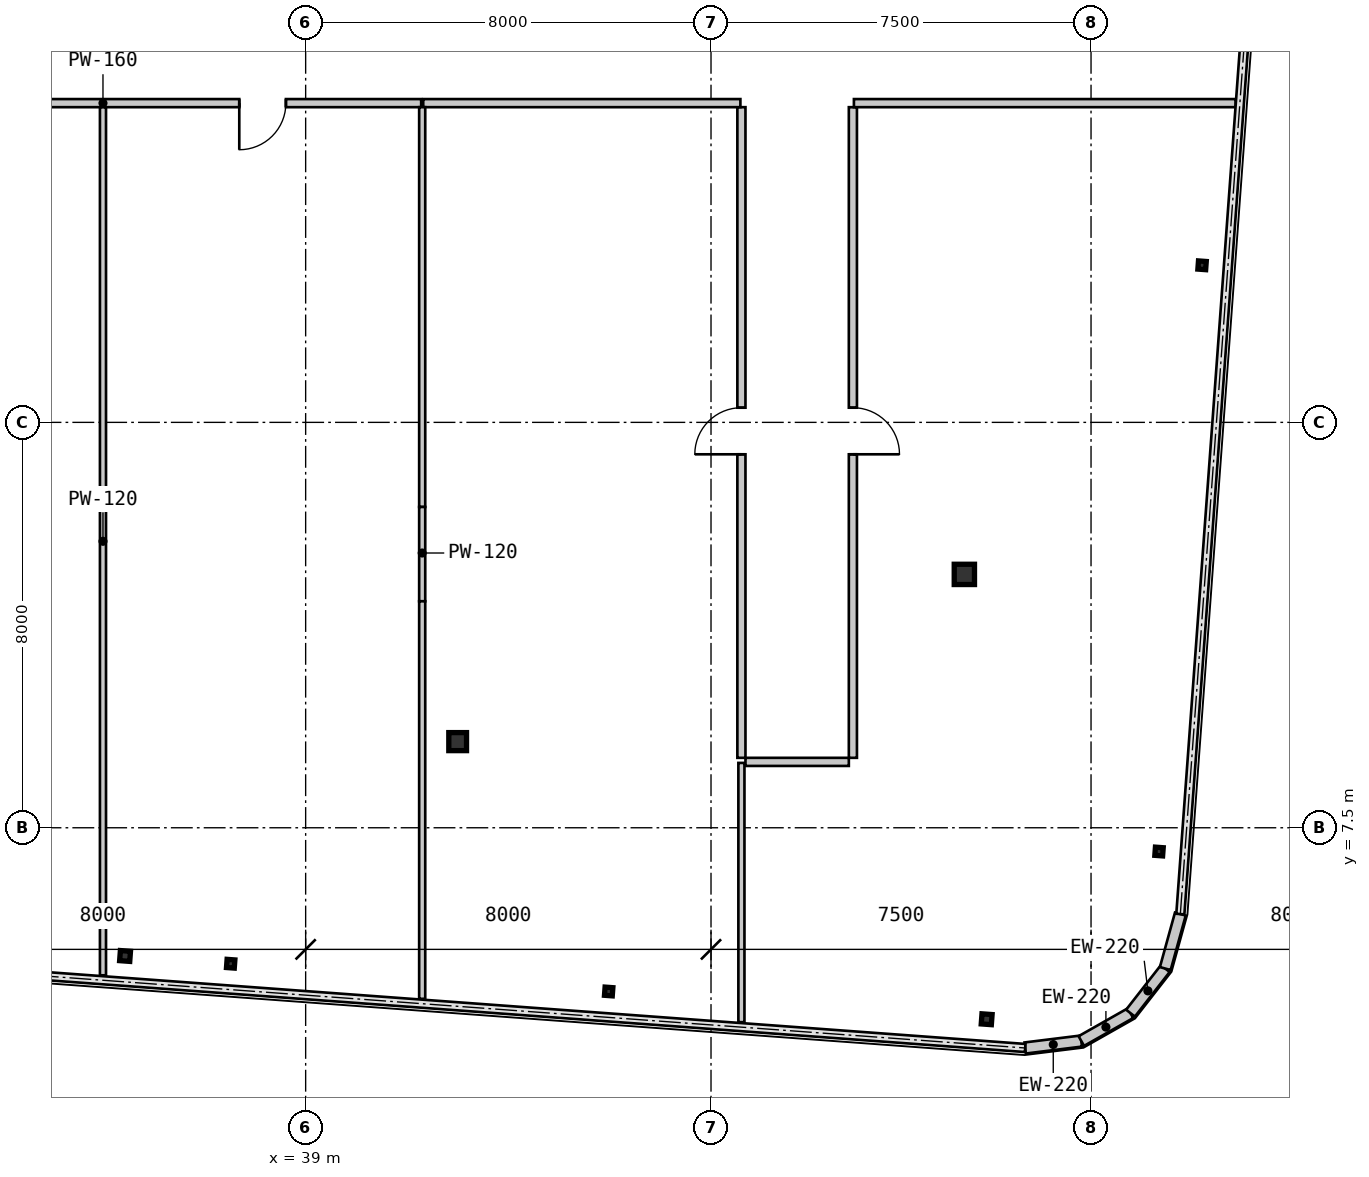
"""IFC4 building model, lengths in metres.
Left out: names, types, materials, properties, quantities, classifications, styles, units other than length and angle.
Written with IfcOpenShell. Run it as: python <this file> out.ifc"""

import sys

from ifc_helpers import new_model, si_unit, direction, frame, frame_2d, origin, origin_2d, place, context, subcontext, project, spatial, rectangle, hollow_rectangle, i_section, extrude, source, transform, mapped, element, fill, save


model = new_model("IFC4")
c1 = context("Model", 3, precision=1e-05, world=origin(), true_north=direction((0.0, 1.0)))
c2 = subcontext(c1, "Body", "Model", "MODEL_VIEW")
j1 = project(units=[si_unit("LENGTHUNIT", "METRE"), si_unit("PLANEANGLEUNIT", "RADIAN")], contexts=[c1])
p1 = place(None, origin())
s1 = spatial("IfcSite", under=j1, at=p1, CompositionType="ELEMENT")
p2 = place(p1, origin())
s2 = spatial("IfcBuilding", under=s1, at=p2, CompositionType="ELEMENT")
p3 = place(p2, frame((0.0, 0.0, 220.85)))
s3 = spatial("IfcBuildingStorey", under=s2, at=p3, CompositionType="ELEMENT", Elevation=220.85)
m1 = source(origin(), c2, "Body", "SweptSolid", [
    extrude(i_section(OverallWidth=0.35, OverallDepth=0.356, WebThickness=0.018, FlangeThickness=0.028, at=origin_2d()), origin(), (0.0, 0.0, 1.0), 3.15),
])
p4 = place(p3, frame((42.0, 9.2, 0.0), z_axis=(0.0, 0.0, 1.0), x_axis=(1.0, 0.0, 0.0)))
e1 = element("IfcColumn", 1, at=p4, inside=s3, PredefinedType="COLUMN", context=c2, shape_type="MappedRepresentation", body=[
    mapped(m1, transform((0.0, 0.0, 0.0), scale=1.0)),
])
m2 = source(origin(), c2, "Body", "SweptSolid", [
    extrude(hollow_rectangle(XDim=0.4, YDim=0.4, WallThickness=0.016, at=origin_2d()), origin(), (0.0, 0.0, 1.0), 3.15),
])
p5 = place(p3, frame((52.0, 12.5, 0.0), z_axis=(0.0, 0.0, 1.0), x_axis=(1.0, 0.0, 0.0)))
e2 = element("IfcColumn", 2, at=p5, inside=s3, PredefinedType="COLUMN", context=c2, shape_type="MappedRepresentation", body=[
    mapped(m2, transform((0.0, 0.0, 0.0), scale=1.0)),
])
m3 = source(origin(), c2, "Body", "SweptSolid", [
    extrude(i_section(OverallWidth=0.154, OverallDepth=0.162, WebThickness=0.008, FlangeThickness=0.011, at=origin_2d()), origin(), (0.0, 0.0, 1.0), 3.15),
])
for number, where, z_axis, x_axis in (
    (3, (37.521, 4.817, 0.0), (0.0, 0.0, 1.0), (0.997, -0.073, 0.0)),
    (4, (44.98, 4.269, 0.0), (0.0, 0.0, 1.0), (0.997, -0.073, 0.0)),
):
    element("IfcColumn", number, at=place(p3, frame(where, z_axis=z_axis, x_axis=x_axis)), inside=s3, PredefinedType="COLUMN", context=c2, shape_type="MappedRepresentation", body=[
        mapped(m3, transform((0.0, 0.0, 0.0), scale=1.0)),
    ])
m4 = source(origin(), c2, "Body", "SweptSolid", [
    extrude(hollow_rectangle(XDim=0.2, YDim=0.2, WallThickness=0.009, at=origin_2d()), origin(), (0.0, 0.0, 1.0), 3.15),
])
p6 = place(p3, frame((52.44, 3.721, 0.0), z_axis=(0.0, 0.0, 1.0), x_axis=(0.997314477224, -0.073238197128, 0.0)))
e5 = element("IfcColumn", 5, at=p6, inside=s3, PredefinedType="COLUMN", context=c2, shape_type="MappedRepresentation", body=[
    mapped(m4, transform((0.0, 0.0, 0.0), scale=1.0)),
])
for number, where, z_axis, x_axis in (
    (6, (55.842, 7.031, 0.0), (0.0, 0.0, 1.0), (0.997, -0.073, 0.0)),
    (7, (56.691, 18.6, 0.0), (0.0, 0.0, 1.0), (0.997, -0.073, 0.0)),
):
    element("IfcColumn", number, at=place(p3, frame(where, z_axis=z_axis, x_axis=x_axis)), inside=s3, PredefinedType="COLUMN", context=c2, shape_type="MappedRepresentation", body=[
        mapped(m3, transform((0.0, 0.0, 0.0), scale=1.0)),
    ])
p7 = place(p3, frame((35.436, 4.97, 0.0), z_axis=(0.0, 0.0, 1.0), x_axis=(0.997314477224, -0.073238197128, 0.0)))
e8 = element("IfcColumn", 8, at=p7, inside=s3, PredefinedType="COLUMN", context=c2, shape_type="MappedRepresentation", body=[
    mapped(m4, transform((0.0, 0.0, 0.0), scale=1.0)),
])
m5 = source(origin(), c2, "Body", "SweptSolid", [
    extrude(rectangle(XDim=1.116, YDim=0.22, at=frame_2d((0.558, 0.0))), origin(), (0.0, 0.0, 1.0), 2.93),
])
p8 = place(p3, frame((53.201, 3.154, 0.0), z_axis=(0.0, 0.0, 1.0), x_axis=(0.992438604032, 0.122742076028, 0.0)))
e9 = element("IfcWall", 9, at=p8, inside=s3, PredefinedType="SOLIDWALL", context=c2, shape_type="MappedRepresentation", body=[
    mapped(m5, transform((0.0, 0.0, 0.0), scale=1.0)),
])
m6 = source(origin(), c2, "Body", "SweptSolid", [
    extrude(rectangle(XDim=1.116, YDim=0.22, at=frame_2d((0.558, 0.0))), origin(), (0.0, 0.0, 1.0), 2.93),
])
p9 = place(p3, frame((54.308, 3.291, 0.0), z_axis=(0.0, 0.0, 1.0), x_axis=(0.869893934693, 0.49323882895, 0.0)))
e10 = element("IfcWall", 10, at=p9, inside=s3, PredefinedType="SOLIDWALL", context=c2, shape_type="MappedRepresentation", body=[
    mapped(m6, transform((0.0, 0.0, 0.0), scale=1.0)),
])
for number, where, z_axis, x_axis in (
    (11, (55.279, 3.841, 0.0), (0.0, 0.0, 1.0), (0.615, 0.789, 0.0)),
    (12, (55.965, 4.721, 0.0), (0.0, 0.0, 1.0), (0.266, 0.964, 0.0)),
):
    element("IfcWall", number, at=place(p3, frame(where, z_axis=z_axis, x_axis=x_axis)), inside=s3, PredefinedType="SOLIDWALL", context=c2, shape_type="MappedRepresentation", body=[
        mapped(m5, transform((0.0, 0.0, 0.0), scale=1.0)),
    ])
m7 = source(origin(), c2, "Body", "SweptSolid", [
    extrude(rectangle(XDim=6.26, YDim=0.16, at=frame_2d((3.13, 0.0))), origin(), (0.0, 0.0, 1.0), 2.93),
])
p10 = place(p3, frame((34.98, 21.8, 0.0), z_axis=(0.0, 0.0, 1.0), x_axis=(-1.0, 0.0, 0.0)))
e13 = element("IfcWall", 13, at=p10, inside=s3, PredefinedType="PARTITIONING", context=c2, shape_type="MappedRepresentation", body=[
    mapped(m7, transform((0.0, 0.0, 0.0), scale=1.0)),
])
m8 = source(origin(), c2, "Body", "SweptSolid", [
    extrude(rectangle(XDim=0.92, YDim=2.1, at=frame_2d((0.46, 1.05))), frame((0.0, 0.09, 0.0), z_axis=(0.0, -1.0, 0.0), x_axis=(1.0, 0.0, 0.0)), (0.0, 0.0, 1.0), 0.18),
])
p11 = place(p10, frame((2.67, 0.0, 0.0)))
e14 = element("IfcOpeningElement", 14, at=p11, cuts=e13, PredefinedType="OPENING", context=c2, shape_type="MappedRepresentation", body=[
    mapped(m8, transform((0.0, 0.0, 0.0), scale=1.0)),
])
p12 = place(p3, frame((41.28, 21.8, 0.0), z_axis=(0.0, 0.0, 1.0), x_axis=(-1.0, 0.0, 0.0)))
e15 = element("IfcWall", 15, at=p12, inside=s3, PredefinedType="PARTITIONING", context=c2, shape_type="MappedRepresentation", body=[
    mapped(m7, transform((0.0, 0.0, 0.0), scale=1.0)),
])
p13 = place(p12, frame((2.67, 0.0, 0.0)))
e16 = element("IfcOpeningElement", 16, at=p13, cuts=e15, PredefinedType="OPENING", context=c2, shape_type="MappedRepresentation", body=[
    mapped(m8, transform((0.0, 0.0, 0.0), scale=1.0)),
])
m9 = source(origin(), c2, "Body", "SweptSolid", [
    extrude(rectangle(XDim=12.84, YDim=0.16, at=frame_2d((6.42, 0.0))), origin(), (0.0, 0.0, 1.0), 2.93),
])
p14 = place(p3, frame((47.6, 8.88, 0.0), z_axis=(0.0, 0.0, 1.0), x_axis=(0.0, 1.0, 0.0)))
e17 = element("IfcWall", 17, at=p14, inside=s3, PredefinedType="PARTITIONING", context=c2, shape_type="MappedRepresentation", body=[
    mapped(m9, transform((0.0, 0.0, 0.0), scale=1.0)),
])
p15 = place(p14, frame((5.99, 0.0, 0.0)))
e18 = element("IfcOpeningElement", 18, at=p15, cuts=e17, PredefinedType="OPENING", context=c2, shape_type="MappedRepresentation", body=[
    mapped(m8, transform((0.0, 0.0, 0.0), scale=1.0)),
])
m10 = source(origin(), c2, "Body", "SweptSolid", [
    extrude(rectangle(XDim=6.259, YDim=0.16, at=frame_2d((3.13, 0.0))), origin(), (0.0, 0.0, 1.0), 2.93),
])
p16 = place(p3, frame((47.58, 21.8, 0.0), z_axis=(0.0, 0.0, 1.0), x_axis=(-1.0, 0.0, 0.0)))
e19 = element("IfcWall", 19, at=p16, inside=s3, PredefinedType="PARTITIONING", context=c2, shape_type="MappedRepresentation", body=[
    mapped(m10, transform((0.0, 0.0, 0.0), scale=1.0)),
])
p17 = place(p3, frame((49.8, 21.72, 0.0), z_axis=(0.0, 0.0, 1.0), x_axis=(0.0, -1.0, 0.0)))
e20 = element("IfcWall", 20, at=p17, inside=s3, PredefinedType="PARTITIONING", context=c2, shape_type="MappedRepresentation", body=[
    mapped(m9, transform((0.0, 0.0, 0.0), scale=1.0)),
])
p18 = place(p17, frame((5.93, 0.0, 0.0)))
e21 = element("IfcOpeningElement", 21, at=p18, cuts=e20, PredefinedType="OPENING", context=c2, shape_type="MappedRepresentation", body=[
    mapped(m8, transform((0.0, 0.0, 0.0), scale=1.0)),
])
m11 = source(origin(), c2, "Body", "SweptSolid", [
    extrude(rectangle(XDim=7.533, YDim=0.16, at=frame_2d((3.767, 0.0))), origin(), (0.0, 0.0, 1.0), 2.93),
])
p19 = place(p3, frame((57.353, 21.8, 0.0), z_axis=(0.0, 0.0, 1.0), x_axis=(-1.0, 0.0, 0.0)))
e22 = element("IfcWall", 22, at=p19, inside=s3, PredefinedType="PARTITIONING", context=c2, shape_type="MappedRepresentation", body=[
    mapped(m11, transform((0.0, 0.0, 0.0), scale=1.0)),
])
m12 = source(origin(), c2, "Body", "SweptSolid", [
    extrude(rectangle(XDim=2.04, YDim=0.16, at=frame_2d((1.02, 0.0))), origin(), (0.0, 0.0, 1.0), 2.93),
])
p20 = place(p3, frame((49.72, 8.8, 0.0), z_axis=(0.0, 0.0, 1.0), x_axis=(-1.0, 0.0, 0.0)))
e23 = element("IfcWall", 23, at=p20, inside=s3, PredefinedType="PARTITIONING", context=c2, shape_type="MappedRepresentation", body=[
    mapped(m12, transform((0.0, 0.0, 0.0), scale=1.0)),
])
m13 = source(origin(), c2, "Body", "SweptSolid", [
    extrude(rectangle(XDim=17.13, YDim=0.12, at=frame_2d((8.565, 0.0))), origin(), (0.0, 0.0, 1.0), 2.93),
])
p21 = place(p3, frame((35.0, 21.718, 0.0), z_axis=(0.0, 0.0, 1.0), x_axis=(0.0, -1.0, 0.0)))
e24 = element("IfcWall", 24, at=p21, inside=s3, PredefinedType="PARTITIONING", context=c2, shape_type="MappedRepresentation", body=[
    mapped(m13, transform((0.0, 0.0, 0.0), scale=1.0)),
])
m14 = source(origin(), c2, "Body", "SweptSolid", [
    extrude(rectangle(XDim=7.89, YDim=0.12, at=frame_2d((3.945, 0.0))), origin(), (0.0, 0.0, 1.0), 2.93),
])
p22 = place(p3, frame((41.3, 21.72, 0.0), z_axis=(0.0, 0.0, 1.0), x_axis=(0.0, -1.0, 0.0)))
e25 = element("IfcWall", 25, at=p22, inside=s3, PredefinedType="PARTITIONING", context=c2, shape_type="MappedRepresentation", body=[
    mapped(m14, transform((0.0, 0.0, 0.0), scale=1.0)),
])
m15 = source(origin(), c2, "Body", "SweptSolid", [
    extrude(rectangle(XDim=1.861, YDim=0.12, at=frame_2d((0.93, 0.0))), origin(), (0.0, 0.0, 1.0), 2.328),
])
p23 = place(p3, frame((41.3, 13.83, 0.0), z_axis=(0.0, 0.0, 1.0), x_axis=(0.0, -1.0, 0.0)))
e26 = element("IfcWall", 26, at=p23, inside=s3, PredefinedType="PARTITIONING", context=c2, shape_type="MappedRepresentation", body=[
    mapped(m15, transform((0.0, 0.0, 0.0), scale=1.0)),
])
m16 = source(origin(), c2, "Body", "SweptSolid", [
    extrude(rectangle(XDim=7.845, YDim=0.12, at=frame_2d((3.923, 0.0))), origin(), (0.0, 0.0, 1.0), 2.93),
])
p24 = place(p3, frame((41.3, 11.969, 0.0), z_axis=(0.0, 0.0, 1.0), x_axis=(0.0, -1.0, 0.0)))
e27 = element("IfcWall", 27, at=p24, inside=s3, PredefinedType="PARTITIONING", context=c2, shape_type="MappedRepresentation", body=[
    mapped(m16, transform((0.0, 0.0, 0.0), scale=1.0)),
])
m17 = source(origin(), c2, "Body", "SweptSolid", [
    extrude(rectangle(XDim=5.116, YDim=0.12, at=frame_2d((2.558, 0.0))), origin(), (0.0, 0.0, 1.0), 2.93),
])
p25 = place(p3, frame((47.6, 8.78, 0.0), z_axis=(0.0, 0.0, 1.0), x_axis=(0.0, -1.0, 0.0)))
e28 = element("IfcWall", 28, at=p25, inside=s3, PredefinedType="PARTITIONING", context=c2, shape_type="MappedRepresentation", body=[
    mapped(m17, transform((0.0, 0.0, 0.0), scale=1.0)),
])
m18 = source(origin(), c2, "Body", "SweptSolid", [
    extrude(rectangle(XDim=0.92, YDim=2.1, at=frame_2d((0.46, 1.05))), frame((0.0, 0.025, 0.0), z_axis=(0.0, -1.0, 0.0), x_axis=(1.0, 0.0, 0.0)), (0.0, 0.0, 1.0), 0.05),
])
p26 = place(p13, origin())
e29 = element("IfcDoor", 29, at=p26, inside=s3, OperationType="SINGLE_SWING_RIGHT", PredefinedType="DOOR", context=c2, shape_type="MappedRepresentation", body=[
    mapped(m18, transform((0.0, 0.0, 0.0), scale=1.0)),
])
fill(e16, e29)
p27 = place(p15, origin())
e30 = element("IfcDoor", 30, at=p27, inside=s3, OperationType="SINGLE_SWING_LEFT", PredefinedType="DOOR", context=c2, shape_type="MappedRepresentation", body=[
    mapped(m18, transform((0.0, 0.0, 0.0), scale=1.0)),
])
fill(e18, e30)
p28 = place(p18, origin())
e31 = element("IfcDoor", 31, at=p28, inside=s3, OperationType="SINGLE_SWING_RIGHT", PredefinedType="DOOR", context=c2, shape_type="MappedRepresentation", body=[
    mapped(m18, transform((0.0, 0.0, 0.0), scale=1.0)),
])
fill(e21, e31)
save(model, sys.argv[1])
